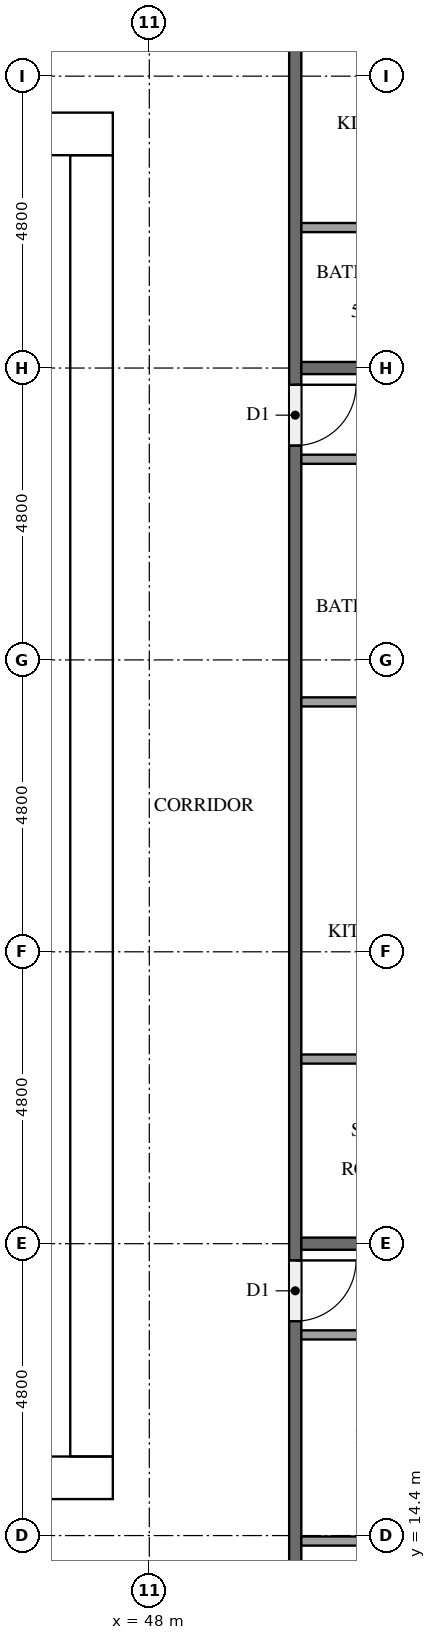
"""IFC4 building model, lengths in metres.
Left out: names, types, materials, properties, quantities, classifications, styles, units other than length and angle.
Written with IfcOpenShell. Run it as: python <this file> out.ifc"""

import sys

from ifc_helpers import new_model, si_unit, direction, frame, frame_2d, origin, place, context, subcontext, project, spatial, rectangle, extrude, element, fill, save


model = new_model("IFC4")
c1 = context("Model", 3, precision=1e-05, world=origin(), true_north=direction((0.0, 1.0)))
c2 = subcontext(c1, "Body", "Model", "MODEL_VIEW")
j1 = project(units=[si_unit("LENGTHUNIT", "METRE"), si_unit("PLANEANGLEUNIT", "RADIAN")], contexts=[c1])
p1 = place(None, origin())
s1 = spatial("IfcSite", under=j1, at=p1, CompositionType="ELEMENT")
p2 = place(p1, origin())
s2 = spatial("IfcBuilding", under=s1, at=p2, CompositionType="ELEMENT")
p3 = place(p2, frame((0.0, 0.0, 226.3)))
s3 = spatial("IfcBuildingStorey", under=s2, at=p3, CompositionType="ELEMENT", Elevation=226.3)
p4 = place(p3, frame((15.0, 15.35, 0.0), z_axis=(0.0, 0.0, 1.0), x_axis=(1.0, 0.0, 0.0)))
e1 = element("IfcWall", 1, at=p4, inside=s3, PredefinedType="SHEAR", context=c2, shape_type="SweptSolid", body=[
    extrude(rectangle(XDim=32.4, YDim=0.7, at=frame_2d((16.2, 0.0))), origin(), (0.0, 0.0, 1.0), 3.2),
])
p5 = place(p4, frame((15.3, 0.0, 0.0)))
e2 = element("IfcOpeningElement", 2, at=p5, cuts=e1, PredefinedType="OPENING", context=c2, shape_type="SweptSolid", body=[
    extrude(rectangle(XDim=1.8, YDim=2.1, at=frame_2d((0.9, 1.05))), frame((0.0, 0.36, 0.0), z_axis=(0.0, -1.0, 0.0), x_axis=(1.0, 0.0, 0.0)), (0.0, 0.0, 1.0), 0.72),
])
p6 = place(p3, frame((15.0, 37.45, 0.0), z_axis=(0.0, 0.0, 1.0), x_axis=(1.0, 0.0, 0.0)))
e3 = element("IfcWall", 3, at=p6, inside=s3, PredefinedType="SHEAR", context=c2, shape_type="SweptSolid", body=[
    extrude(rectangle(XDim=32.4, YDim=0.7, at=frame_2d((16.2, 0.0))), origin(), (0.0, 0.0, 1.0), 3.2),
])
p7 = place(p6, frame((15.3, 0.0, 0.0)))
e4 = element("IfcOpeningElement", 4, at=p7, cuts=e3, PredefinedType="OPENING", context=c2, shape_type="SweptSolid", body=[
    extrude(rectangle(XDim=1.8, YDim=2.1, at=frame_2d((0.9, 1.05))), frame((0.0, 0.36, 0.0), z_axis=(0.0, -1.0, 0.0), x_axis=(1.0, 0.0, 0.0)), (0.0, 0.0, 1.0), 0.72),
])
p8 = place(p6, frame((1.544, 0.0, 0.0)))
e5 = element("IfcOpeningElement", 5, at=p8, cuts=e3, PredefinedType="OPENING", context=c2, shape_type="SweptSolid", body=[
    extrude(rectangle(XDim=1.0, YDim=2.1, at=frame_2d((0.5, 1.05))), frame((0.0, 0.36, 0.0), z_axis=(0.0, -1.0, 0.0), x_axis=(1.0, 0.0, 0.0)), (0.0, 0.0, 1.0), 0.72),
])
p9 = place(p6, frame((5.219, 0.0, 0.0)))
e6 = element("IfcOpeningElement", 6, at=p9, cuts=e3, PredefinedType="OPENING", context=c2, shape_type="SweptSolid", body=[
    extrude(rectangle(XDim=1.0, YDim=2.1, at=frame_2d((0.5, 1.05))), frame((0.0, 0.36, 0.0), z_axis=(0.0, -1.0, 0.0), x_axis=(1.0, 0.0, 0.0)), (0.0, 0.0, 1.0), 0.72),
])
p10 = place(p3, frame((47.05, 15.7, 0.0), z_axis=(0.0, 0.0, 1.0), x_axis=(0.0, 1.0, 0.0)))
e7 = element("IfcWall", 7, at=p10, inside=s3, PredefinedType="SHEAR", context=c2, shape_type="SweptSolid", body=[
    extrude(rectangle(XDim=21.4, YDim=0.7, at=frame_2d((10.7, 0.0))), origin(), (0.0, 0.0, 1.0), 3.2),
])
p11 = place(p10, frame((10.4, 0.0, 0.0)))
e8 = element("IfcOpeningElement", 8, at=p11, cuts=e7, PredefinedType="OPENING", context=c2, shape_type="SweptSolid", body=[
    extrude(rectangle(XDim=1.2, YDim=2.1, at=frame_2d((0.6, 1.05))), frame((0.0, 0.36, 0.0), z_axis=(0.0, -1.0, 0.0), x_axis=(1.0, 0.0, 0.0)), (0.0, 0.0, 1.0), 0.72),
])
p12 = place(p3, frame((50.4, 40.7, 0.0), z_axis=(0.0, 0.0, 1.0), x_axis=(0.0, -1.0, 0.0)))
e9 = element("IfcWall", 9, at=p12, inside=s3, PredefinedType="PARTITIONING", context=c2, shape_type="SweptSolid", body=[
    extrude(rectangle(XDim=28.6, YDim=0.2, at=frame_2d((14.3, 0.0))), origin(), (0.0, 0.0, 1.0), 3.2),
])
p13 = place(p12, frame((21.775, 0.0, 0.0)))
e10 = element("IfcOpeningElement", 10, at=p13, cuts=e9, PredefinedType="OPENING", context=c2, shape_type="SweptSolid", body=[
    extrude(rectangle(XDim=1.0, YDim=2.1, at=frame_2d((0.5, 1.05))), frame((0.0, 0.11, 0.0), z_axis=(0.0, -1.0, 0.0), x_axis=(1.0, 0.0, 0.0)), (0.0, 0.0, 1.0), 0.22),
])
p14 = place(p12, frame((7.375, 0.0, 0.0)))
e11 = element("IfcOpeningElement", 11, at=p14, cuts=e9, PredefinedType="OPENING", context=c2, shape_type="SweptSolid", body=[
    extrude(rectangle(XDim=1.0, YDim=2.1, at=frame_2d((0.5, 1.05))), frame((0.0, 0.11, 0.0), z_axis=(0.0, -1.0, 0.0), x_axis=(1.0, 0.0, 0.0)), (0.0, 0.0, 1.0), 0.22),
])
p15 = place(p12, frame((0.175, 0.0, 0.0)))
e12 = element("IfcOpeningElement", 12, at=p15, cuts=e9, PredefinedType="OPENING", context=c2, shape_type="SweptSolid", body=[
    extrude(rectangle(XDim=1.0, YDim=2.1, at=frame_2d((0.5, 1.05))), frame((0.0, 0.11, 0.0), z_axis=(0.0, -1.0, 0.0), x_axis=(1.0, 0.0, 0.0)), (0.0, 0.0, 1.0), 0.22),
])
p16 = place(p3, frame((50.5, 19.2, 0.0), z_axis=(0.0, 0.0, 1.0), x_axis=(1.0, 0.0, 0.0)))
e13 = element("IfcWall", 13, at=p16, inside=s3, PredefinedType="PARTITIONING", context=c2, shape_type="SweptSolid", body=[
    extrude(rectangle(XDim=11.575, YDim=0.2, at=frame_2d((5.788, 0.0))), origin(), (0.0, 0.0, 1.0), 3.2),
])
p17 = place(p3, frame((50.5, 33.6, 0.0), z_axis=(0.0, 0.0, 1.0), x_axis=(1.0, 0.0, 0.0)))
e14 = element("IfcWall", 14, at=p17, inside=s3, PredefinedType="PARTITIONING", context=c2, shape_type="SweptSolid", body=[
    extrude(rectangle(XDim=11.8, YDim=0.2, at=frame_2d((5.9, 0.0))), origin(), (0.0, 0.0, 1.0), 3.2),
])
p18 = place(p3, frame((50.5, 14.31, 0.0), z_axis=(0.0, 0.0, 1.0), x_axis=(1.0, 0.0, 0.0)))
e15 = element("IfcWall", 15, at=p18, inside=s3, PredefinedType="PARTITIONING", context=c2, shape_type="SweptSolid", body=[
    extrude(rectangle(XDim=3.875, YDim=0.15, at=frame_2d((1.938, 0.0))), origin(), (0.0, 0.0, 1.0), 3.2),
])
p19 = place(p3, frame((50.5, 17.7, 0.0), z_axis=(0.0, 0.0, 1.0), x_axis=(1.0, 0.0, 0.0)))
e16 = element("IfcWall", 16, at=p19, inside=s3, PredefinedType="PARTITIONING", context=c2, shape_type="SweptSolid", body=[
    extrude(rectangle(XDim=4.025, YDim=0.15, at=frame_2d((2.012, 0.0))), origin(), (0.0, 0.0, 1.0), 3.2),
])
for number, where, z_axis, x_axis in (
    (17, (50.5, 28.11, 0.0), (0.0, 0.0, 1.0), (1.0, 0.0, 0.0)),
    (18, (50.5, 22.237, 0.0), (0.0, 0.0, 1.0), (1.0, 0.0, 0.0)),
):
    element("IfcWall", number, at=place(p3, frame(where, z_axis=z_axis, x_axis=x_axis)), inside=s3, PredefinedType="PARTITIONING", context=c2, shape_type="SweptSolid", body=[
        extrude(rectangle(XDim=2.975, YDim=0.15, at=frame_2d((1.488, 0.0))), origin(), (0.0, 0.0, 1.0), 3.2),
    ])
p20 = place(p3, frame((50.5, 32.1, 0.0), z_axis=(0.0, 0.0, 1.0), x_axis=(1.0, 0.0, 0.0)))
e19 = element("IfcWall", 19, at=p20, inside=s3, PredefinedType="PARTITIONING", context=c2, shape_type="SweptSolid", body=[
    extrude(rectangle(XDim=3.125, YDim=0.15, at=frame_2d((1.562, 0.0))), origin(), (0.0, 0.0, 1.0), 3.2),
])
p21 = place(p3, frame((50.5, 35.91, 0.0), z_axis=(0.0, 0.0, 1.0), x_axis=(1.0, 0.0, 0.0)))
e20 = element("IfcWall", 20, at=p21, inside=s3, PredefinedType="PARTITIONING", context=c2, shape_type="SweptSolid", body=[
    extrude(rectangle(XDim=3.275, YDim=0.15, at=frame_2d((1.637, 0.0))), origin(), (0.0, 0.0, 1.0), 3.2),
])
p22 = place(p11, origin())
e21 = element("IfcDoor", 21, at=p22, inside=s3, OperationType="SINGLE_SWING_LEFT", PredefinedType="DOOR", context=c2, shape_type="SweptSolid", body=[
    extrude(rectangle(XDim=1.2, YDim=2.1, at=frame_2d((0.6, 1.05))), frame((0.0, 0.025, 0.0), z_axis=(0.0, -1.0, 0.0), x_axis=(1.0, 0.0, 0.0)), (0.0, 0.0, 1.0), 0.05),
])
fill(e8, e21)
p23 = place(p13, origin())
e22 = element("IfcDoor", 22, at=p23, inside=s3, OperationType="SINGLE_SWING_LEFT", PredefinedType="DOOR", context=c2, shape_type="SweptSolid", body=[
    extrude(rectangle(XDim=1.0, YDim=2.1, at=frame_2d((0.5, 1.05))), frame((0.0, 0.025, 0.0), z_axis=(0.0, -1.0, 0.0), x_axis=(1.0, 0.0, 0.0)), (0.0, 0.0, 1.0), 0.05),
])
fill(e10, e22)
p24 = place(p14, origin())
e23 = element("IfcDoor", 23, at=p24, inside=s3, OperationType="SINGLE_SWING_LEFT", PredefinedType="DOOR", context=c2, shape_type="SweptSolid", body=[
    extrude(rectangle(XDim=1.0, YDim=2.1, at=frame_2d((0.5, 1.05))), frame((0.0, 0.025, 0.0), z_axis=(0.0, -1.0, 0.0), x_axis=(1.0, 0.0, 0.0)), (0.0, 0.0, 1.0), 0.05),
])
fill(e11, e23)
save(model, sys.argv[1])
